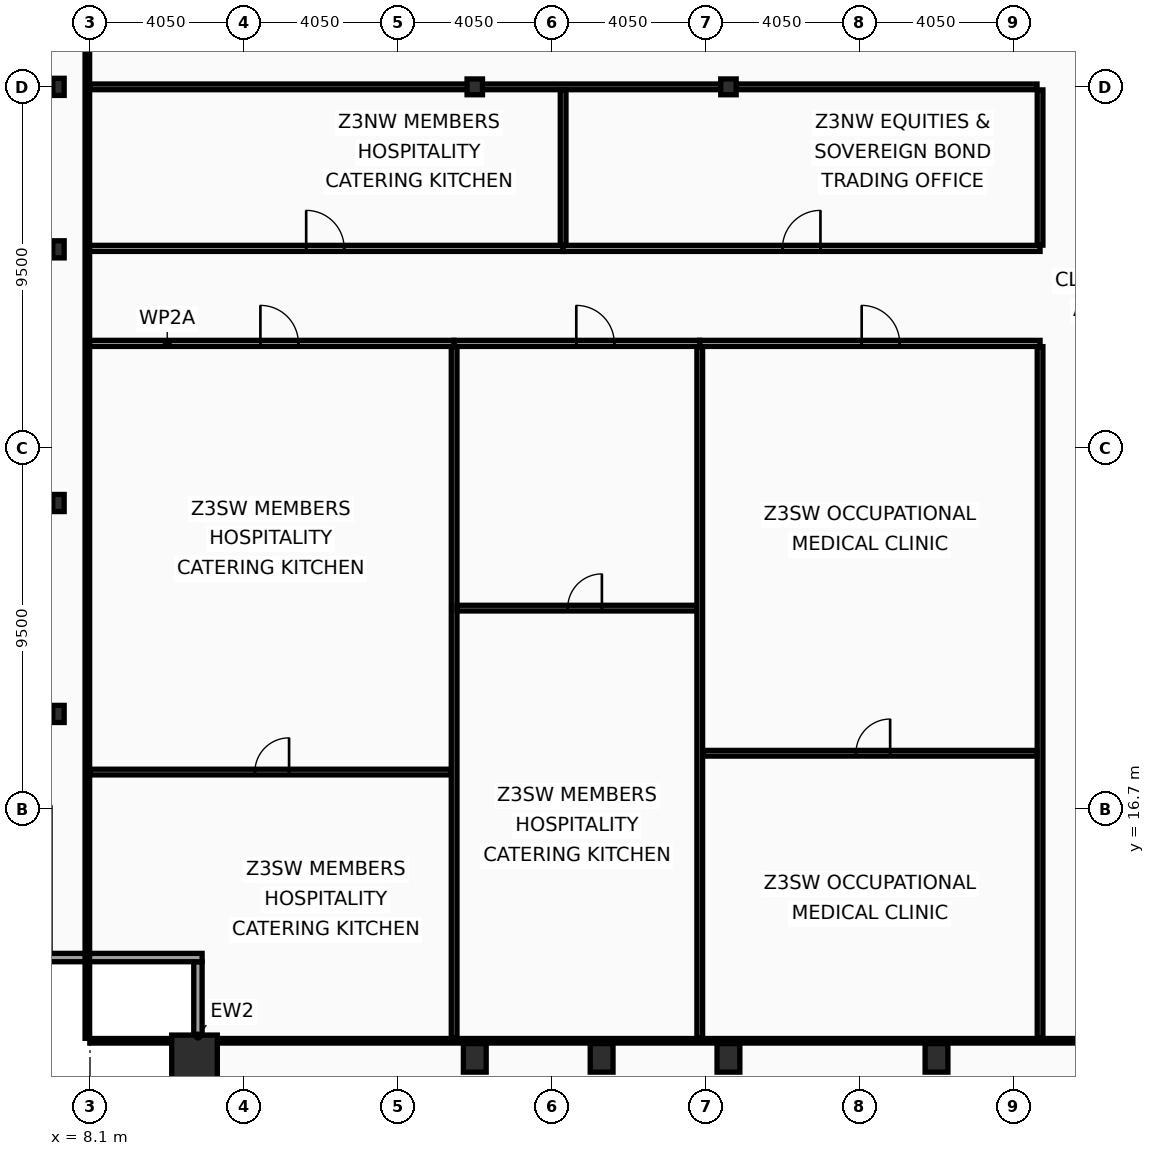
"""IFC4 building model, lengths in metres.
Left out: names, types, materials, properties, quantities, classifications, styles, units other than length and angle.
Written with IfcOpenShell. Run it as: python <this file> out.ifc"""

import sys

from ifc_helpers import new_model, si_unit, direction, frame, frame_2d, origin, origin_2d, place, context, subcontext, project, spatial, rectangle, hollow_rectangle, i_section, extrude, element, fill, save


model = new_model("IFC4")
c1 = context("Model", 3, precision=1e-05, world=origin(), true_north=direction((0.0, 1.0)))
c2 = subcontext(c1, "Body", "Model", "MODEL_VIEW")
j1 = project(units=[si_unit("LENGTHUNIT", "METRE"), si_unit("PLANEANGLEUNIT", "RADIAN")], contexts=[c1])
p1 = place(None, origin())
s1 = spatial("IfcSite", under=j1, at=p1, CompositionType="ELEMENT")
p2 = place(p1, origin())
s2 = spatial("IfcBuilding", under=s1, at=p2, CompositionType="ELEMENT")
p3 = place(p2, frame((0.0, 0.0, 217.4)))
s3 = spatial("IfcBuildingStorey", under=s2, at=p3, CompositionType="ELEMENT", Elevation=217.4)
p4 = place(p3, frame((10.85, 10.15, 0.0), z_axis=(0.0, 0.0, 1.0), x_axis=(1.0, 0.0, 0.0)))
e1 = element("IfcColumn", 1, at=p4, inside=s3, PredefinedType="COLUMN", context=c2, shape_type="SweptSolid", body=[
    extrude(hollow_rectangle(XDim=1.2, YDim=1.2, WallThickness=0.06, at=origin_2d()), origin(), (0.0, 0.0, 1.0), 3.6),
])
for number, where, z_axis, x_axis in (
    (2, (18.225, 10.15, 0.0), (0.0, 0.0, 1.0), (1.0, 0.0, 0.0)),
    (3, (21.562, 10.15, 0.0), (0.0, 0.0, 1.0), (1.0, 0.0, 0.0)),
    (4, (24.9, 10.15, 0.0), (0.0, 0.0, 1.0), (1.0, 0.0, 0.0)),
    (5, (30.375, 10.15, 0.0), (0.0, 0.0, 1.0), (1.0, 0.0, 0.0)),
):
    element("IfcColumn", number, at=place(p3, frame(where, z_axis=z_axis, x_axis=x_axis)), inside=s3, PredefinedType="COLUMN", context=c2, shape_type="SweptSolid", body=[
        extrude(hollow_rectangle(XDim=0.6, YDim=0.75, WallThickness=0.045, at=origin_2d()), origin(), (0.0, 0.0, 1.0), 3.6),
    ])
for number, where, z_axis, x_axis in (
    (6, (7.27, 19.2, 0.0), (0.0, 0.0, 1.0), (1.0, 0.0, 0.0)),
    (7, (7.27, 24.75, 0.0), (0.0, 0.0, 1.0), (1.0, 0.0, 0.0)),
    (8, (7.27, 31.425, 0.0), (0.0, 0.0, 1.0), (1.0, 0.0, 0.0)),
    (9, (7.27, 35.7, 0.0), (0.0, 0.0, 1.0), (1.0, 0.0, 0.0)),
):
    element("IfcColumn", number, at=place(p3, frame(where, z_axis=z_axis, x_axis=x_axis)), inside=s3, PredefinedType="COLUMN", context=c2, shape_type="SweptSolid", body=[
        extrude(i_section(OverallWidth=0.3, OverallDepth=0.45, WebThickness=0.014, FlangeThickness=0.026, at=origin_2d()), origin(), (0.0, 0.0, 1.0), 3.6),
    ])
for number, where, z_axis, x_axis in (
    (10, (18.225, 35.7, 0.0), (0.0, 0.0, 1.0), (1.0, 0.0, 0.0)),
    (11, (24.9, 35.7, 0.0), (0.0, 0.0, 1.0), (1.0, 0.0, 0.0)),
):
    element("IfcColumn", number, at=place(p3, frame(where, z_axis=z_axis, x_axis=x_axis)), inside=s3, PredefinedType="COLUMN", context=c2, shape_type="SweptSolid", body=[
        extrude(i_section(OverallWidth=0.406, OverallDepth=0.416, WebThickness=0.03, FlangeThickness=0.048, at=origin_2d()), origin(), (0.0, 0.0, 1.0), 3.6),
    ])
p5 = place(p3, frame((10.94, 8.77, 0.0), z_axis=(0.0, 0.0, 1.0), x_axis=(0.0, 1.0, 0.0)))
e12 = element("IfcWall", 12, at=p5, inside=s3, PredefinedType="SOLIDWALL", context=c2, shape_type="SweptSolid", body=[
    extrude(rectangle(XDim=3.91, YDim=0.22, at=frame_2d((1.955, 0.0))), origin(), (0.0, 0.0, 1.0), 2.83),
])
p6 = place(p3, frame((11.05, 12.79, 0.0), z_axis=(0.0, 0.0, 1.0), x_axis=(-1.0, 0.0, 0.0)))
e13 = element("IfcWall", 13, at=p6, inside=s3, PredefinedType="SOLIDWALL", context=c2, shape_type="SweptSolid", body=[
    extrude(rectangle(XDim=4.22, YDim=0.22, at=frame_2d((2.11, 0.0))), origin(), (0.0, 0.0, 1.0), 2.83),
])
p7 = place(p3, frame((33.1, 10.665, 0.0), z_axis=(0.0, 0.0, 1.0), x_axis=(0.0, 1.0, 0.0)))
e14 = element("IfcWall", 14, at=p7, inside=s3, PredefinedType="PARTITIONING", context=c2, shape_type="SweptSolid", body=[
    extrude(rectangle(XDim=18.2, YDim=0.15, at=frame_2d((9.1, 0.0))), origin(), (0.0, 0.0, 1.0), 2.98),
])
p8 = place(p3, frame((33.1, 31.535, 0.0), z_axis=(0.0, 0.0, 1.0), x_axis=(0.0, 1.0, 0.0)))
e15 = element("IfcWall", 15, at=p8, inside=s3, PredefinedType="PARTITIONING", context=c2, shape_type="SweptSolid", body=[
    extrude(rectangle(XDim=4.085, YDim=0.15, at=frame_2d((2.042, 0.0))), origin(), (0.0, 0.0, 1.0), 2.98),
])
p9 = place(p3, frame((8.095, 35.7, 0.0), z_axis=(0.0, 0.0, 1.0), x_axis=(1.0, 0.0, 0.0)))
e16 = element("IfcWall", 16, at=p9, inside=s3, PredefinedType="PARTITIONING", context=c2, shape_type="SweptSolid", body=[
    extrude(rectangle(XDim=24.925, YDim=0.15, at=frame_2d((12.462, 0.0))), origin(), (0.0, 0.0, 1.0), 2.78),
])
p10 = place(p3, frame((8.03, 28.95, 0.0), z_axis=(0.0, 0.0, 1.0), x_axis=(1.0, 0.0, 0.0)))
e17 = element("IfcWall", 17, at=p10, inside=s3, PredefinedType="PARTITIONING", context=c2, shape_type="SweptSolid", body=[
    extrude(rectangle(XDim=9.652, YDim=0.16, at=frame_2d((4.826, 0.0))), origin(), (0.0, 0.0, 1.0), 3.44),
])
p11 = place(p10, frame((4.554, 0.0, 0.0)))
e18 = element("IfcOpeningElement", 18, at=p11, cuts=e17, PredefinedType="OPENING", context=c2, shape_type="SweptSolid", body=[
    extrude(rectangle(XDim=1.0, YDim=2.05, at=frame_2d((0.5, 1.025))), frame((0.0, 0.09, 0.0), z_axis=(0.0, -1.0, 0.0), x_axis=(1.0, 0.0, 0.0)), (0.0, 0.0, 1.0), 0.18),
])
p12 = place(p3, frame((8.095, 17.671, 0.0), z_axis=(0.0, 0.0, 1.0), x_axis=(1.0, 0.0, 0.0)))
e19 = element("IfcWall", 19, at=p12, inside=s3, PredefinedType="PARTITIONING", context=c2, shape_type="SweptSolid", body=[
    extrude(rectangle(XDim=9.507, YDim=0.15, at=frame_2d((4.753, 0.0))), origin(), (0.0, 0.0, 1.0), 2.83),
])
p13 = place(p12, frame((4.343, 0.0, 0.0)))
e20 = element("IfcOpeningElement", 20, at=p13, cuts=e19, PredefinedType="OPENING", context=c2, shape_type="SweptSolid", body=[
    extrude(rectangle(XDim=0.9, YDim=2.05, at=frame_2d((0.45, 1.025))), frame((0.0, 0.085, 0.0), z_axis=(0.0, -1.0, 0.0), x_axis=(1.0, 0.0, 0.0)), (0.0, 0.0, 1.0), 0.17),
])
p14 = place(p3, frame((17.682, 28.95, 0.0), z_axis=(0.0, 0.0, 1.0), x_axis=(1.0, 0.0, 0.0)))
e21 = element("IfcWall", 21, at=p14, inside=s3, PredefinedType="PARTITIONING", context=c2, shape_type="SweptSolid", body=[
    extrude(rectangle(XDim=6.463, YDim=0.16, at=frame_2d((3.232, 0.0))), origin(), (0.0, 0.0, 1.0), 2.78),
])
p15 = place(p14, frame((3.215, 0.0, 0.0)))
e22 = element("IfcOpeningElement", 22, at=p15, cuts=e21, PredefinedType="OPENING", context=c2, shape_type="SweptSolid", body=[
    extrude(rectangle(XDim=1.0, YDim=2.05, at=frame_2d((0.5, 1.025))), frame((0.0, 0.09, 0.0), z_axis=(0.0, -1.0, 0.0), x_axis=(1.0, 0.0, 0.0)), (0.0, 0.0, 1.0), 0.18),
])
p16 = place(p3, frame((17.682, 10.665, 0.0), z_axis=(0.0, 0.0, 1.0), x_axis=(0.0, 1.0, 0.0)))
e23 = element("IfcWall", 23, at=p16, inside=s3, PredefinedType="PARTITIONING", context=c2, shape_type="SweptSolid", body=[
    extrude(rectangle(XDim=18.2, YDim=0.15, at=frame_2d((9.1, 0.0))), origin(), (0.0, 0.0, 1.0), 2.78),
])
p17 = place(p3, frame((17.762, 21.984, 0.0), z_axis=(0.0, 0.0, 1.0), x_axis=(1.0, 0.0, 0.0)))
e24 = element("IfcWall", 24, at=p17, inside=s3, PredefinedType="PARTITIONING", context=c2, shape_type="SweptSolid", body=[
    extrude(rectangle(XDim=6.303, YDim=0.15, at=frame_2d((3.152, 0.0))), origin(), (0.0, 0.0, 1.0), 2.78),
])
p18 = place(p17, frame((2.908, 0.0, 0.0)))
e25 = element("IfcOpeningElement", 25, at=p18, cuts=e24, PredefinedType="OPENING", context=c2, shape_type="SweptSolid", body=[
    extrude(rectangle(XDim=0.9, YDim=2.05, at=frame_2d((0.45, 1.025))), frame((0.0, 0.085, 0.0), z_axis=(0.0, -1.0, 0.0), x_axis=(1.0, 0.0, 0.0)), (0.0, 0.0, 1.0), 0.17),
])
p19 = place(p3, frame((24.145, 28.95, 0.0), z_axis=(0.0, 0.0, 1.0), x_axis=(1.0, 0.0, 0.0)))
e26 = element("IfcWall", 26, at=p19, inside=s3, PredefinedType="PARTITIONING", context=c2, shape_type="SweptSolid", body=[
    extrude(rectangle(XDim=8.955, YDim=0.16, at=frame_2d((4.478, 0.0))), origin(), (0.0, 0.0, 1.0), 2.78),
])
p20 = place(p19, frame((4.261, 0.0, 0.0)))
e27 = element("IfcOpeningElement", 27, at=p20, cuts=e26, PredefinedType="OPENING", context=c2, shape_type="SweptSolid", body=[
    extrude(rectangle(XDim=1.0, YDim=2.05, at=frame_2d((0.5, 1.025))), frame((0.0, 0.09, 0.0), z_axis=(0.0, -1.0, 0.0), x_axis=(1.0, 0.0, 0.0)), (0.0, 0.0, 1.0), 0.18),
])
p21 = place(p3, frame((24.145, 10.665, 0.0), z_axis=(0.0, 0.0, 1.0), x_axis=(0.0, 1.0, 0.0)))
e28 = element("IfcWall", 28, at=p21, inside=s3, PredefinedType="PARTITIONING", context=c2, shape_type="SweptSolid", body=[
    extrude(rectangle(XDim=18.2, YDim=0.15, at=frame_2d((9.1, 0.0))), origin(), (0.0, 0.0, 1.0), 2.98),
])
p22 = place(p3, frame((24.225, 18.166, 0.0), z_axis=(0.0, 0.0, 1.0), x_axis=(1.0, 0.0, 0.0)))
e29 = element("IfcWall", 29, at=p22, inside=s3, PredefinedType="PARTITIONING", context=c2, shape_type="SweptSolid", body=[
    extrude(rectangle(XDim=8.795, YDim=0.15, at=frame_2d((4.397, 0.0))), origin(), (0.0, 0.0, 1.0), 2.78),
])
p23 = place(p22, frame((4.03, 0.0, 0.0)))
e30 = element("IfcOpeningElement", 30, at=p23, cuts=e29, PredefinedType="OPENING", context=c2, shape_type="SweptSolid", body=[
    extrude(rectangle(XDim=0.9, YDim=2.05, at=frame_2d((0.45, 1.025))), frame((0.0, 0.085, 0.0), z_axis=(0.0, -1.0, 0.0), x_axis=(1.0, 0.0, 0.0)), (0.0, 0.0, 1.0), 0.17),
])
p24 = place(p3, frame((8.03, 31.45, 0.0), z_axis=(0.0, 0.0, 1.0), x_axis=(1.0, 0.0, 0.0)))
e31 = element("IfcWall", 31, at=p24, inside=s3, PredefinedType="PARTITIONING", context=c2, shape_type="SweptSolid", body=[
    extrude(rectangle(XDim=12.52, YDim=0.16, at=frame_2d((6.26, 0.0))), origin(), (0.0, 0.0, 1.0), 2.78),
])
p25 = place(p24, frame((5.758, 0.0, 0.0)))
e32 = element("IfcOpeningElement", 32, at=p25, cuts=e31, PredefinedType="OPENING", context=c2, shape_type="SweptSolid", body=[
    extrude(rectangle(XDim=1.0, YDim=2.05, at=frame_2d((0.5, 1.025))), frame((0.0, 0.09, 0.0), z_axis=(0.0, -1.0, 0.0), x_axis=(1.0, 0.0, 0.0)), (0.0, 0.0, 1.0), 0.18),
])
p26 = place(p3, frame((20.55, 31.45, 0.0), z_axis=(0.0, 0.0, 1.0), x_axis=(1.0, 0.0, 0.0)))
e33 = element("IfcWall", 33, at=p26, inside=s3, PredefinedType="PARTITIONING", context=c2, shape_type="SweptSolid", body=[
    extrude(rectangle(XDim=12.55, YDim=0.16, at=frame_2d((6.275, 0.0))), origin(), (0.0, 0.0, 1.0), 2.78),
])
p27 = place(p26, frame((5.771, 0.0, 0.0)))
e34 = element("IfcOpeningElement", 34, at=p27, cuts=e33, PredefinedType="OPENING", context=c2, shape_type="SweptSolid", body=[
    extrude(rectangle(XDim=1.0, YDim=2.05, at=frame_2d((0.5, 1.025))), frame((0.0, 0.09, 0.0), z_axis=(0.0, -1.0, 0.0), x_axis=(1.0, 0.0, 0.0)), (0.0, 0.0, 1.0), 0.18),
])
p28 = place(p3, frame((20.55, 31.535, 0.0), z_axis=(0.0, 0.0, 1.0), x_axis=(0.0, 1.0, 0.0)))
e35 = element("IfcWall", 35, at=p28, inside=s3, PredefinedType="PARTITIONING", context=c2, shape_type="SweptSolid", body=[
    extrude(rectangle(XDim=4.085, YDim=0.15, at=frame_2d((2.042, 0.0))), origin(), (0.0, 0.0, 1.0), 2.98),
])
p29 = place(p3, frame((8.03, 10.665, 0.0), z_axis=(0.0, 0.0, 1.0), x_axis=(0.0, 1.0, 0.0)))
e36 = element("IfcWall", 36, at=p29, inside=s3, PredefinedType="PARTITIONING", context=c2, shape_type="SweptSolid", body=[
    extrude(rectangle(XDim=42.11, YDim=0.12, at=frame_2d((21.055, 0.0))), origin(), (0.0, 0.0, 1.0), 2.78),
])
p30 = place(p3, frame((8.095, 10.6, 0.0), z_axis=(0.0, 0.0, 1.0), x_axis=(1.0, 0.0, 0.0)))
e37 = element("IfcWall", 37, at=p30, inside=s3, PredefinedType="PARTITIONING", context=c2, shape_type="SweptSolid", body=[
    extrude(rectangle(XDim=56.71, YDim=0.12, at=frame_2d((28.355, 0.0))), origin(), (0.0, 0.0, 1.0), 2.78),
])
p31 = place(p11, origin())
e38 = element("IfcDoor", 38, at=p31, inside=s3, OperationType="SINGLE_SWING_LEFT", PredefinedType="DOOR", context=c2, shape_type="SweptSolid", body=[
    extrude(rectangle(XDim=1.0, YDim=2.05, at=frame_2d((0.5, 1.025))), frame((0.0, 0.025, 0.0), z_axis=(0.0, -1.0, 0.0), x_axis=(1.0, 0.0, 0.0)), (0.0, 0.0, 1.0), 0.05),
])
fill(e18, e38)
p32 = place(p13, origin())
e39 = element("IfcDoor", 39, at=p32, inside=s3, OperationType="SINGLE_SWING_RIGHT", PredefinedType="DOOR", context=c2, shape_type="SweptSolid", body=[
    extrude(rectangle(XDim=0.9, YDim=2.05, at=frame_2d((0.45, 1.025))), frame((0.0, 0.025, 0.0), z_axis=(0.0, -1.0, 0.0), x_axis=(1.0, 0.0, 0.0)), (0.0, 0.0, 1.0), 0.05),
])
fill(e20, e39)
p33 = place(p15, origin())
e40 = element("IfcDoor", 40, at=p33, inside=s3, OperationType="SINGLE_SWING_LEFT", PredefinedType="DOOR", context=c2, shape_type="SweptSolid", body=[
    extrude(rectangle(XDim=1.0, YDim=2.05, at=frame_2d((0.5, 1.025))), frame((0.0, 0.025, 0.0), z_axis=(0.0, -1.0, 0.0), x_axis=(1.0, 0.0, 0.0)), (0.0, 0.0, 1.0), 0.05),
])
fill(e22, e40)
p34 = place(p18, origin())
e41 = element("IfcDoor", 41, at=p34, inside=s3, OperationType="SINGLE_SWING_RIGHT", PredefinedType="DOOR", context=c2, shape_type="SweptSolid", body=[
    extrude(rectangle(XDim=0.9, YDim=2.05, at=frame_2d((0.45, 1.025))), frame((0.0, 0.025, 0.0), z_axis=(0.0, -1.0, 0.0), x_axis=(1.0, 0.0, 0.0)), (0.0, 0.0, 1.0), 0.05),
])
fill(e25, e41)
p35 = place(p20, origin())
e42 = element("IfcDoor", 42, at=p35, inside=s3, OperationType="SINGLE_SWING_LEFT", PredefinedType="DOOR", context=c2, shape_type="SweptSolid", body=[
    extrude(rectangle(XDim=1.0, YDim=2.05, at=frame_2d((0.5, 1.025))), frame((0.0, 0.025, 0.0), z_axis=(0.0, -1.0, 0.0), x_axis=(1.0, 0.0, 0.0)), (0.0, 0.0, 1.0), 0.05),
])
fill(e27, e42)
p36 = place(p23, origin())
e43 = element("IfcDoor", 43, at=p36, inside=s3, OperationType="SINGLE_SWING_RIGHT", PredefinedType="DOOR", context=c2, shape_type="SweptSolid", body=[
    extrude(rectangle(XDim=0.9, YDim=2.05, at=frame_2d((0.45, 1.025))), frame((0.0, 0.025, 0.0), z_axis=(0.0, -1.0, 0.0), x_axis=(1.0, 0.0, 0.0)), (0.0, 0.0, 1.0), 0.05),
])
fill(e30, e43)
p37 = place(p25, origin())
e44 = element("IfcDoor", 44, at=p37, inside=s3, OperationType="SINGLE_SWING_LEFT", PredefinedType="DOOR", context=c2, shape_type="SweptSolid", body=[
    extrude(rectangle(XDim=1.0, YDim=2.05, at=frame_2d((0.5, 1.025))), frame((0.0, 0.025, 0.0), z_axis=(0.0, -1.0, 0.0), x_axis=(1.0, 0.0, 0.0)), (0.0, 0.0, 1.0), 0.05),
])
fill(e32, e44)
p38 = place(p27, origin())
e45 = element("IfcDoor", 45, at=p38, inside=s3, OperationType="SINGLE_SWING_RIGHT", PredefinedType="DOOR", context=c2, shape_type="SweptSolid", body=[
    extrude(rectangle(XDim=1.0, YDim=2.05, at=frame_2d((0.5, 1.025))), frame((0.0, 0.025, 0.0), z_axis=(0.0, -1.0, 0.0), x_axis=(1.0, 0.0, 0.0)), (0.0, 0.0, 1.0), 0.05),
])
fill(e34, e45)
save(model, sys.argv[1])
